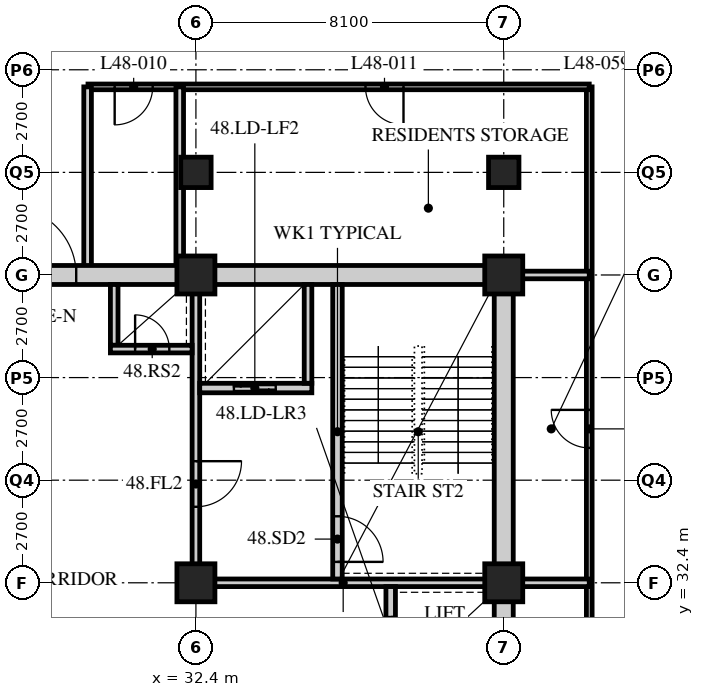
"""IFC4 building model, lengths in metres.
Left out: names, types, materials, properties, quantities, classifications, styles, units other than length and angle.
Written with IfcOpenShell. Run it as: python <this file> out.ifc"""

import sys

from ifc_helpers import new_model, si_unit, direction, frame, frame_2d, origin, origin_2d, place, context, subcontext, project, spatial, rectangle, hollow_rectangle, extrude, element, fill, save


model = new_model("IFC4")
c1 = context("Model", 3, precision=1e-05, world=origin(), true_north=direction((0.0, 1.0)))
c2 = subcontext(c1, "Body", "Model", "MODEL_VIEW")
j1 = project(units=[si_unit("LENGTHUNIT", "METRE"), si_unit("PLANEANGLEUNIT", "RADIAN")], contexts=[c1])
p1 = place(None, origin())
s1 = spatial("IfcSite", under=j1, at=p1, CompositionType="ELEMENT")
p2 = place(p1, origin())
s2 = spatial("IfcBuilding", under=s1, at=p2, CompositionType="ELEMENT")
p3 = place(p2, frame((0.0, 0.0, 188.4)))
s3 = spatial("IfcBuildingStorey", under=s2, at=p3, CompositionType="ELEMENT", Elevation=188.4)
for number, where, z_axis, x_axis in (
    (1, (32.4, 32.4, 0.0), (0.0, 0.0, 1.0), (1.0, 0.0, 0.0)),
    (2, (32.4, 40.5, 0.0), (0.0, 0.0, 1.0), (1.0, 0.0, 0.0)),
):
    element("IfcColumn", number, at=place(p3, frame(where, z_axis=z_axis, x_axis=x_axis)), inside=s3, PredefinedType="COLUMN", context=c2, shape_type="SweptSolid", body=[
        extrude(hollow_rectangle(XDim=1.0, YDim=1.0, WallThickness=0.1, at=origin_2d()), origin(), (0.0, 0.0, 1.0), 3.6),
    ])
p4 = place(p3, frame((32.4, 43.2, 0.0), z_axis=(0.0, 0.0, 1.0), x_axis=(1.0, 0.0, 0.0)))
e3 = element("IfcColumn", 3, at=p4, inside=s3, PredefinedType="COLUMN", context=c2, shape_type="SweptSolid", body=[
    extrude(hollow_rectangle(XDim=0.8, YDim=0.8, WallThickness=0.08, at=origin_2d()), origin(), (0.0, 0.0, 1.0), 3.6),
])
for number, where, z_axis, x_axis in (
    (4, (40.5, 32.4, 0.0), (0.0, 0.0, 1.0), (1.0, 0.0, 0.0)),
    (5, (40.5, 40.5, 0.0), (0.0, 0.0, 1.0), (1.0, 0.0, 0.0)),
):
    element("IfcColumn", number, at=place(p3, frame(where, z_axis=z_axis, x_axis=x_axis)), inside=s3, PredefinedType="COLUMN", context=c2, shape_type="SweptSolid", body=[
        extrude(hollow_rectangle(XDim=1.0, YDim=1.0, WallThickness=0.1, at=origin_2d()), origin(), (0.0, 0.0, 1.0), 3.6),
    ])
p5 = place(p3, frame((40.5, 43.2, 0.0), z_axis=(0.0, 0.0, 1.0), x_axis=(1.0, 0.0, 0.0)))
e6 = element("IfcColumn", 6, at=p5, inside=s3, PredefinedType="COLUMN", context=c2, shape_type="SweptSolid", body=[
    extrude(hollow_rectangle(XDim=0.8, YDim=0.8, WallThickness=0.08, at=origin_2d()), origin(), (0.0, 0.0, 1.0), 3.6),
])
p6 = place(p3, frame((42.75, 20.7, 0.0), z_axis=(0.0, 0.0, 1.0), x_axis=(0.0, 1.0, 0.0)))
e7 = element("IfcWall", 7, at=p6, inside=s3, PredefinedType="PARTITIONING", context=c2, shape_type="SweptSolid", body=[
    extrude(rectangle(XDim=24.75, YDim=0.15, at=frame_2d((12.375, 0.0))), origin(), (0.0, 0.0, 1.0), 3.39),
])
p7 = place(p6, frame((7.15, 0.0, 0.0)))
e8 = element("IfcOpeningElement", 8, at=p7, cuts=e7, PredefinedType="OPENING", context=c2, shape_type="SweptSolid", body=[
    extrude(rectangle(XDim=1.0, YDim=2.1, at=frame_2d((0.5, 1.05))), frame((0.0, 0.085, 0.0), z_axis=(0.0, -1.0, 0.0), x_axis=(1.0, 0.0, 0.0)), (0.0, 0.0, 1.0), 0.17),
])
p8 = place(p6, frame((15.25, 0.0, 0.0)))
e9 = element("IfcOpeningElement", 9, at=p8, cuts=e7, PredefinedType="OPENING", context=c2, shape_type="SweptSolid", body=[
    extrude(rectangle(XDim=1.0, YDim=2.1, at=frame_2d((0.5, 1.05))), frame((0.0, 0.085, 0.0), z_axis=(0.0, -1.0, 0.0), x_axis=(1.0, 0.0, 0.0)), (0.0, 0.0, 1.0), 0.17),
])
p9 = place(p3, frame((42.75, 45.45, 0.0), z_axis=(0.0, 0.0, 1.0), x_axis=(-1.0, 0.0, 0.0)))
e10 = element("IfcWall", 10, at=p9, inside=s3, PredefinedType="PARTITIONING", context=c2, shape_type="SweptSolid", body=[
    extrude(rectangle(XDim=13.19, YDim=0.15, at=frame_2d((6.595, 0.0))), origin(), (0.0, 0.0, 1.0), 3.39),
])
p10 = place(p9, frame((11.488, 0.0, 0.0)))
e11 = element("IfcOpeningElement", 11, at=p10, cuts=e10, PredefinedType="OPENING", context=c2, shape_type="SweptSolid", body=[
    extrude(rectangle(XDim=1.0, YDim=2.1, at=frame_2d((0.5, 1.05))), frame((0.0, 0.085, 0.0), z_axis=(0.0, -1.0, 0.0), x_axis=(1.0, 0.0, 0.0)), (0.0, 0.0, 1.0), 0.17),
])
p11 = place(p9, frame((4.888, 0.0, 0.0)))
e12 = element("IfcOpeningElement", 12, at=p11, cuts=e10, PredefinedType="OPENING", context=c2, shape_type="SweptSolid", body=[
    extrude(rectangle(XDim=1.0, YDim=2.1, at=frame_2d((0.5, 1.05))), frame((0.0, 0.085, 0.0), z_axis=(0.0, -1.0, 0.0), x_axis=(1.0, 0.0, 0.0)), (0.0, 0.0, 1.0), 0.17),
])
p12 = place(p3, frame((40.5, 32.4, 0.0), z_axis=(0.0, 0.0, 1.0), x_axis=(1.0, 0.0, 0.0)))
e13 = element("IfcWall", 13, at=p12, inside=s3, PredefinedType="SOLIDWALL", context=c2, shape_type="SweptSolid", body=[
    extrude(rectangle(XDim=2.25, YDim=0.2, at=frame_2d((1.125, 0.0))), origin(), (0.0, 0.0, 1.0), 3.39),
])
p13 = place(p3, frame((31.974, 45.45, 0.0), z_axis=(0.0, 0.0, 1.0), x_axis=(0.0, -1.0, 0.0)))
e14 = element("IfcWall", 14, at=p13, inside=s3, PredefinedType="SOLIDWALL", context=c2, shape_type="SweptSolid", body=[
    extrude(rectangle(XDim=4.95, YDim=0.2, at=frame_2d((2.475, 0.0))), origin(), (0.0, 0.0, 1.0), 2.69),
])
p14 = place(p3, frame((29.55, 40.5, 0.0), z_axis=(0.0, 0.0, 1.0), x_axis=(0.0, 1.0, 0.0)))
e15 = element("IfcWall", 15, at=p14, inside=s3, PredefinedType="SOLIDWALL", context=c2, shape_type="SweptSolid", body=[
    extrude(rectangle(XDim=4.95, YDim=0.2, at=frame_2d((2.475, 0.0))), origin(), (0.0, 0.0, 1.0), 3.39),
])
p15 = place(p3, frame((40.5, 40.5, 0.0), z_axis=(0.0, 0.0, 1.0), x_axis=(1.0, 0.0, 0.0)))
e16 = element("IfcWall", 16, at=p15, inside=s3, PredefinedType="SOLIDWALL", context=c2, shape_type="SweptSolid", body=[
    extrude(rectangle(XDim=2.25, YDim=0.2, at=frame_2d((1.125, 0.0))), origin(), (0.0, 0.0, 1.0), 3.39),
])
p16 = place(p3, frame((15.95, 40.5, 0.0), z_axis=(0.0, 0.0, 1.0), x_axis=(1.0, 0.0, 0.0)))
e17 = element("IfcWall", 17, at=p16, inside=s3, PredefinedType="SOLIDWALL", context=c2, shape_type="SweptSolid", body=[
    extrude(rectangle(XDim=24.8, YDim=0.5, at=frame_2d((12.4, 0.0))), origin(), (0.0, 0.0, 1.0), 2.74),
])
p17 = place(p16, frame((11.5, 0.0, 0.0)))
e18 = element("IfcOpeningElement", 18, at=p17, cuts=e17, PredefinedType="OPENING", context=c2, shape_type="SweptSolid", body=[
    extrude(rectangle(XDim=1.8, YDim=2.4, at=frame_2d((0.9, 1.2))), frame((0.0, 0.26, 0.0), z_axis=(0.0, -1.0, 0.0), x_axis=(1.0, 0.0, 0.0)), (0.0, 0.0, 1.0), 0.52),
])
p18 = place(p3, frame((40.5, 24.55, 0.0), z_axis=(0.0, 0.0, 1.0), x_axis=(0.0, 1.0, 0.0)))
e19 = element("IfcWall", 19, at=p18, inside=s3, PredefinedType="SOLIDWALL", context=c2, shape_type="SweptSolid", body=[
    extrude(rectangle(XDim=15.7, YDim=0.5, at=frame_2d((7.85, 0.0))), origin(), (0.0, 0.0, 1.0), 2.778),
])
p19 = place(p3, frame((32.3, 32.4, 0.0), z_axis=(0.0, 0.0, 1.0), x_axis=(1.0, 0.0, 0.0)))
e20 = element("IfcWall", 20, at=p19, inside=s3, PredefinedType="SOLIDWALL", context=c2, shape_type="SweptSolid", body=[
    extrude(rectangle(XDim=7.95, YDim=0.2, at=frame_2d((3.975, 0.0))), origin(), (0.0, 0.0, 1.0), 2.778),
])
p20 = place(p3, frame((32.4, 32.5, 0.0), z_axis=(0.0, 0.0, 1.0), x_axis=(0.0, 1.0, 0.0)))
e21 = element("IfcWall", 21, at=p20, inside=s3, PredefinedType="SOLIDWALL", context=c2, shape_type="SweptSolid", body=[
    extrude(rectangle(XDim=7.75, YDim=0.2, at=frame_2d((3.875, 0.0))), origin(), (0.0, 0.0, 1.0), 2.778),
])
p21 = place(p20, frame((1.9, 0.0, 0.0)))
e22 = element("IfcOpeningElement", 22, at=p21, cuts=e21, PredefinedType="OPENING", context=c2, shape_type="SweptSolid", body=[
    extrude(rectangle(XDim=1.2, YDim=2.1, at=frame_2d((0.6, 1.05))), frame((0.0, 0.11, 0.0), z_axis=(0.0, -1.0, 0.0), x_axis=(1.0, 0.0, 0.0)), (0.0, 0.0, 1.0), 0.22),
])
p22 = place(p3, frame((37.525, 24.55, 0.0), z_axis=(0.0, 0.0, 1.0), x_axis=(0.0, 1.0, 0.0)))
e23 = element("IfcWall", 23, at=p22, inside=s3, PredefinedType="SOLIDWALL", context=c2, shape_type="SweptSolid", body=[
    extrude(rectangle(XDim=7.75, YDim=0.25, at=frame_2d((3.875, 0.0))), origin(), (0.0, 0.0, 1.0), 3.39),
])
p23 = place(p22, frame((0.65, 0.0, 0.0)))
e24 = element("IfcOpeningElement", 24, at=p23, cuts=e23, PredefinedType="OPENING", context=c2, shape_type="SweptSolid", body=[
    extrude(rectangle(XDim=1.1, YDim=2.4, at=frame_2d((0.55, 1.2))), frame((0.0, 0.135, 0.0), z_axis=(0.0, -1.0, 0.0), x_axis=(1.0, 0.0, 0.0)), (0.0, 0.0, 1.0), 0.27),
])
p24 = place(p22, frame((3.25, 0.0, 0.0)))
e25 = element("IfcOpeningElement", 25, at=p24, cuts=e23, PredefinedType="OPENING", context=c2, shape_type="SweptSolid", body=[
    extrude(rectangle(XDim=1.1, YDim=2.4, at=frame_2d((0.55, 1.2))), frame((0.0, 0.135, 0.0), z_axis=(0.0, -1.0, 0.0), x_axis=(1.0, 0.0, 0.0)), (0.0, 0.0, 1.0), 0.27),
])
p25 = place(p22, frame((5.85, 0.0, 0.0)))
e26 = element("IfcOpeningElement", 26, at=p25, cuts=e23, PredefinedType="OPENING", context=c2, shape_type="SweptSolid", body=[
    extrude(rectangle(XDim=1.1, YDim=2.4, at=frame_2d((0.55, 1.2))), frame((0.0, 0.135, 0.0), z_axis=(0.0, -1.0, 0.0), x_axis=(1.0, 0.0, 0.0)), (0.0, 0.0, 1.0), 0.27),
])
p26 = place(p3, frame((36.125, 32.5, 0.0), z_axis=(0.0, 0.0, 1.0), x_axis=(0.0, 1.0, 0.0)))
e27 = element("IfcWall", 27, at=p26, inside=s3, PredefinedType="SOLIDWALL", context=c2, shape_type="SweptSolid", body=[
    extrude(rectangle(XDim=7.75, YDim=0.25, at=frame_2d((3.875, 0.0))), origin(), (0.0, 0.0, 1.0), 3.39),
])
p27 = place(p26, frame((0.45, 0.0, 0.0)))
e28 = element("IfcOpeningElement", 28, at=p27, cuts=e27, PredefinedType="OPENING", context=c2, shape_type="SweptSolid", body=[
    extrude(rectangle(XDim=1.2, YDim=2.1, at=frame_2d((0.6, 1.05))), frame((0.0, 0.135, 0.0), z_axis=(0.0, -1.0, 0.0), x_axis=(1.0, 0.0, 0.0)), (0.0, 0.0, 1.0), 0.27),
])
p28 = place(p3, frame((32.5, 37.525, 0.0), z_axis=(0.0, 0.0, 1.0), x_axis=(1.0, 0.0, 0.0)))
e29 = element("IfcWall", 29, at=p28, inside=s3, PredefinedType="SOLIDWALL", context=c2, shape_type="SweptSolid", body=[
    extrude(rectangle(XDim=2.95, YDim=0.25, at=frame_2d((1.475, 0.0))), origin(), (0.0, 0.0, 1.0), 3.39),
])
p29 = place(p28, frame((0.9, 0.0, 0.0)))
e30 = element("IfcOpeningElement", 30, at=p29, cuts=e29, PredefinedType="OPENING", context=c2, shape_type="SweptSolid", body=[
    extrude(rectangle(XDim=1.1, YDim=2.4, at=frame_2d((0.55, 1.2))), frame((0.0, 0.135, 0.0), z_axis=(0.0, -1.0, 0.0), x_axis=(1.0, 0.0, 0.0)), (0.0, 0.0, 1.0), 0.27),
])
p30 = place(p3, frame((35.35, 37.65, 0.0), z_axis=(0.0, 0.0, 1.0), x_axis=(0.0, 1.0, 0.0)))
e31 = element("IfcWall", 31, at=p30, inside=s3, PredefinedType="SOLIDWALL", context=c2, shape_type="SweptSolid", body=[
    extrude(rectangle(XDim=2.6, YDim=0.2, at=frame_2d((1.3, 0.0))), origin(), (0.0, 0.0, 1.0), 3.39),
])
p31 = place(p3, frame((30.25, 38.65, 0.0), z_axis=(0.0, 0.0, 1.0), x_axis=(0.0, 1.0, 0.0)))
e32 = element("IfcWall", 32, at=p31, inside=s3, PredefinedType="SOLIDWALL", context=c2, shape_type="SweptSolid", body=[
    extrude(rectangle(XDim=1.6, YDim=0.2, at=frame_2d((0.8, 0.0))), origin(), (0.0, 0.0, 1.0), 3.39),
])
p32 = place(p3, frame((30.15, 38.55, 0.0), z_axis=(0.0, 0.0, 1.0), x_axis=(1.0, 0.0, 0.0)))
e33 = element("IfcWall", 33, at=p32, inside=s3, PredefinedType="SOLIDWALL", context=c2, shape_type="SweptSolid", body=[
    extrude(rectangle(XDim=2.15, YDim=0.2, at=frame_2d((1.075, 0.0))), origin(), (0.0, 0.0, 1.0), 3.39),
])
p33 = place(p32, frame((0.65, 0.0, 0.0)))
e34 = element("IfcOpeningElement", 34, at=p33, cuts=e33, PredefinedType="OPENING", context=c2, shape_type="SweptSolid", body=[
    extrude(rectangle(XDim=0.9, YDim=2.1, at=frame_2d((0.45, 1.05))), frame((0.0, 0.11, 0.0), z_axis=(0.0, -1.0, 0.0), x_axis=(1.0, 0.0, 0.0)), (0.0, 0.0, 1.0), 0.22),
])
p34 = place(p8, origin())
e35 = element("IfcDoor", 35, at=p34, inside=s3, OperationType="SINGLE_SWING_RIGHT", PredefinedType="DOOR", context=c2, shape_type="SweptSolid", body=[
    extrude(rectangle(XDim=1.0, YDim=2.1, at=frame_2d((0.5, 1.05))), frame((0.0, 0.025, 0.0), z_axis=(0.0, -1.0, 0.0), x_axis=(1.0, 0.0, 0.0)), (0.0, 0.0, 1.0), 0.05),
])
fill(e9, e35)
p35 = place(p10, origin())
e36 = element("IfcDoor", 36, at=p35, inside=s3, OperationType="SINGLE_SWING_RIGHT", PredefinedType="DOOR", context=c2, shape_type="SweptSolid", body=[
    extrude(rectangle(XDim=1.0, YDim=2.1, at=frame_2d((0.5, 1.05))), frame((0.0, 0.025, 0.0), z_axis=(0.0, -1.0, 0.0), x_axis=(1.0, 0.0, 0.0)), (0.0, 0.0, 1.0), 0.05),
])
fill(e11, e36)
p36 = place(p11, origin())
e37 = element("IfcDoor", 37, at=p36, inside=s3, OperationType="SINGLE_SWING_LEFT", PredefinedType="DOOR", context=c2, shape_type="SweptSolid", body=[
    extrude(rectangle(XDim=1.0, YDim=2.1, at=frame_2d((0.5, 1.05))), frame((0.0, 0.025, 0.0), z_axis=(0.0, -1.0, 0.0), x_axis=(1.0, 0.0, 0.0)), (0.0, 0.0, 1.0), 0.05),
])
fill(e12, e37)
p37 = place(p27, origin())
e38 = element("IfcDoor", 38, at=p37, inside=s3, OperationType="SINGLE_SWING_RIGHT", PredefinedType="DOOR", context=c2, shape_type="SweptSolid", body=[
    extrude(rectangle(XDim=1.2, YDim=2.1, at=frame_2d((0.6, 1.05))), frame((0.0, 0.025, 0.0), z_axis=(0.0, -1.0, 0.0), x_axis=(1.0, 0.0, 0.0)), (0.0, 0.0, 1.0), 0.05),
])
fill(e28, e38)
p38 = place(p21, origin())
e39 = element("IfcDoor", 39, at=p38, inside=s3, OperationType="SINGLE_SWING_LEFT", PredefinedType="DOOR", context=c2, shape_type="SweptSolid", body=[
    extrude(rectangle(XDim=1.2, YDim=2.1, at=frame_2d((0.6, 1.05))), frame((0.0, 0.025, 0.0), z_axis=(0.0, -1.0, 0.0), x_axis=(1.0, 0.0, 0.0)), (0.0, 0.0, 1.0), 0.05),
])
fill(e22, e39)
p39 = place(p33, origin())
e40 = element("IfcDoor", 40, at=p39, inside=s3, OperationType="SINGLE_SWING_LEFT", PredefinedType="DOOR", context=c2, shape_type="SweptSolid", body=[
    extrude(rectangle(XDim=0.9, YDim=2.1, at=frame_2d((0.45, 1.05))), frame((0.0, 0.025, 0.0), z_axis=(0.0, -1.0, 0.0), x_axis=(1.0, 0.0, 0.0)), (0.0, 0.0, 1.0), 0.05),
])
fill(e34, e40)
p40 = place(p25, origin())
e41 = element("IfcDoor", 41, at=p40, inside=s3, OperationType="DOUBLE_DOOR_SLIDING", PredefinedType="DOOR", context=c2, shape_type="SweptSolid", body=[
    extrude(rectangle(XDim=1.1, YDim=2.4, at=frame_2d((0.55, 1.2))), frame((0.0, 0.025, 0.0), z_axis=(0.0, -1.0, 0.0), x_axis=(1.0, 0.0, 0.0)), (0.0, 0.0, 1.0), 0.05),
])
fill(e26, e41)
p41 = place(p29, origin())
e42 = element("IfcDoor", 42, at=p41, inside=s3, OperationType="DOUBLE_DOOR_SLIDING", PredefinedType="DOOR", context=c2, shape_type="SweptSolid", body=[
    extrude(rectangle(XDim=1.1, YDim=2.4, at=frame_2d((0.55, 1.2))), frame((0.0, 0.025, 0.0), z_axis=(0.0, -1.0, 0.0), x_axis=(1.0, 0.0, 0.0)), (0.0, 0.0, 1.0), 0.05),
])
fill(e30, e42)
p42 = place(p17, origin())
e43 = element("IfcDoor", 43, at=p42, inside=s3, OperationType="DOUBLE_DOOR_SINGLE_SWING", PredefinedType="DOOR", context=c2, shape_type="SweptSolid", body=[
    extrude(rectangle(XDim=1.8, YDim=2.4, at=frame_2d((0.9, 1.2))), frame((0.0, 0.025, 0.0), z_axis=(0.0, -1.0, 0.0), x_axis=(1.0, 0.0, 0.0)), (0.0, 0.0, 1.0), 0.05),
])
fill(e18, e43)
save(model, sys.argv[1])
